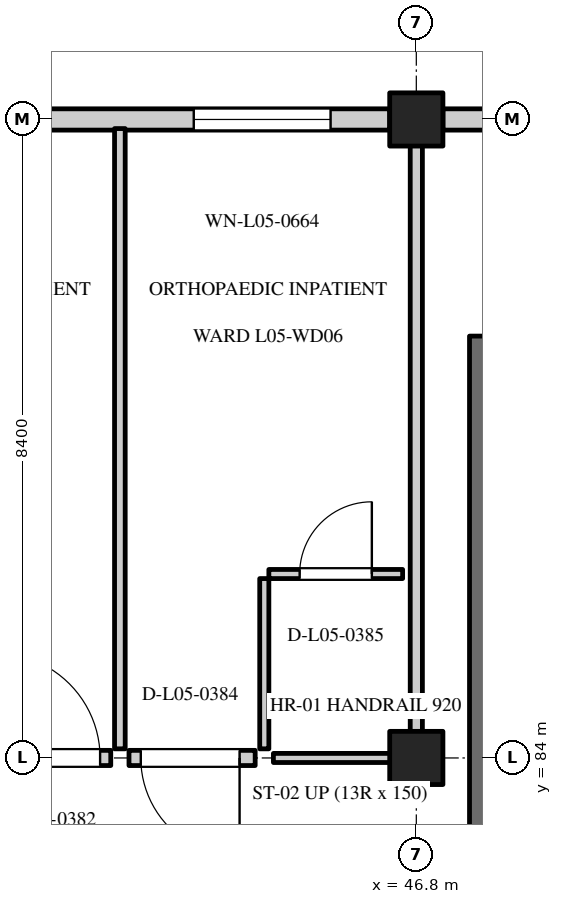
"""IFC4 building model, lengths in metres.
Left out: names, types, materials, properties, quantities, classifications, styles, units other than length and angle.
Written with IfcOpenShell. Run it as: python <this file> out.ifc"""

import sys

from ifc_helpers import new_model, si_unit, direction, frame, frame_2d, origin, origin_2d, place, context, subcontext, project, spatial, rectangle, extrude, element, fill, save


model = new_model("IFC4")
c1 = context("Model", 3, precision=1e-05, world=origin(), true_north=direction((0.0, 1.0)))
c2 = subcontext(c1, "Body", "Model", "MODEL_VIEW")
j1 = project(units=[si_unit("LENGTHUNIT", "METRE"), si_unit("PLANEANGLEUNIT", "RADIAN")], contexts=[c1])
p1 = place(None, origin())
s1 = spatial("IfcSite", under=j1, at=p1, CompositionType="ELEMENT")
p2 = place(p1, origin())
s2 = spatial("IfcBuilding", under=s1, at=p2, CompositionType="ELEMENT")
p3 = place(p2, frame((0.0, 0.0, 22.2)))
s3 = spatial("IfcBuildingStorey", under=s2, at=p3, CompositionType="ELEMENT", Elevation=22.2)
for number, where, z_axis, x_axis in (
    (1, (46.8, 84.0, 0.0), (0.0, 0.0, 1.0), (1.0, 0.0, 0.0)),
    (2, (46.8, 92.4, 0.0), (0.0, 0.0, 1.0), (1.0, 0.0, 0.0)),
):
    element("IfcColumn", number, at=place(p3, frame(where, z_axis=z_axis, x_axis=x_axis)), inside=s3, PredefinedType="COLUMN", context=c2, shape_type="SweptSolid", body=[
        extrude(rectangle(XDim=0.7, YDim=0.7, at=origin_2d()), origin(), (0.0, 0.0, 1.0), 3.9),
    ])
p4 = place(p3, frame((39.35, 92.4, 0.0), z_axis=(0.0, 0.0, 1.0), x_axis=(1.0, 0.0, 0.0)))
e3 = element("IfcWall", 3, at=p4, inside=s3, PredefinedType="STANDARD", context=c2, shape_type="SweptSolid", body=[
    extrude(rectangle(XDim=7.1, YDim=0.28, at=frame_2d((3.55, 0.0))), origin(), (0.0, 0.0, 1.0), 3.05),
])
p5 = place(p4, frame((0.778, 0.0, 0.8)))
e4 = element("IfcOpeningElement", 4, at=p5, cuts=e3, PredefinedType="OPENING", context=c2, shape_type="SweptSolid", body=[
    extrude(rectangle(XDim=1.8, YDim=1.55, at=frame_2d((0.9, 0.775))), frame((0.0, 0.152, 0.0), z_axis=(0.0, -1.0, 0.0), x_axis=(1.0, 0.0, 0.0)), (0.0, 0.0, 1.0), 0.304),
])
p6 = place(p4, frame((4.522, 0.0, 0.8)))
e5 = element("IfcOpeningElement", 5, at=p6, cuts=e3, PredefinedType="OPENING", context=c2, shape_type="SweptSolid", body=[
    extrude(rectangle(XDim=1.8, YDim=1.55, at=frame_2d((0.9, 0.775))), frame((0.0, 0.152, 0.0), z_axis=(0.0, -1.0, 0.0), x_axis=(1.0, 0.0, 0.0)), (0.0, 0.0, 1.0), 0.304),
])
p7 = place(p3, frame((47.15, 92.4, 0.0), z_axis=(0.0, 0.0, 1.0), x_axis=(1.0, 0.0, 0.0)))
e6 = element("IfcWall", 6, at=p7, inside=s3, PredefinedType="STANDARD", context=c2, shape_type="SweptSolid", body=[
    extrude(rectangle(XDim=7.075, YDim=0.28, at=frame_2d((3.538, 0.0))), origin(), (0.0, 0.0, 1.0), 3.05),
])
p8 = place(p7, frame((0.778, 0.0, 0.8)))
e7 = element("IfcOpeningElement", 7, at=p8, cuts=e6, PredefinedType="OPENING", context=c2, shape_type="SweptSolid", body=[
    extrude(rectangle(XDim=1.8, YDim=1.45, at=frame_2d((0.9, 0.725))), frame((0.0, 0.152, 0.0), z_axis=(0.0, -1.0, 0.0), x_axis=(1.0, 0.0, 0.0)), (0.0, 0.0, 1.0), 0.304),
])
p9 = place(p7, frame((4.522, 0.0, 0.8)))
e8 = element("IfcOpeningElement", 8, at=p9, cuts=e6, PredefinedType="OPENING", context=c2, shape_type="SweptSolid", body=[
    extrude(rectangle(XDim=1.8, YDim=1.45, at=frame_2d((0.9, 0.725))), frame((0.0, 0.152, 0.0), z_axis=(0.0, -1.0, 0.0), x_axis=(1.0, 0.0, 0.0)), (0.0, 0.0, 1.0), 0.304),
])
p10 = place(p3, frame((47.675, 79.05, 0.0), z_axis=(0.0, 0.0, 1.0), x_axis=(0.0, 1.0, 0.0)))
e9 = element("IfcWall", 9, at=p10, inside=s3, PredefinedType="SHEAR", context=c2, shape_type="SweptSolid", body=[
    extrude(rectangle(XDim=10.5, YDim=0.35, at=frame_2d((5.25, 0.0))), origin(), (0.0, 0.0, 1.0), 3.9),
])
p11 = place(p3, frame((42.9, 84.12, 0.0), z_axis=(0.0, 0.0, 1.0), x_axis=(0.0, 1.0, 0.0)))
e10 = element("IfcWall", 10, at=p11, inside=s3, PredefinedType="PARTITIONING", context=c2, shape_type="SweptSolid", body=[
    extrude(rectangle(XDim=8.16, YDim=0.14, at=frame_2d((4.08, 0.0))), origin(), (0.0, 0.0, 1.0), 3.58),
])
p12 = place(p3, frame((41.12, 84.0, 0.0), z_axis=(0.0, 0.0, 1.0), x_axis=(1.0, 0.0, 0.0)))
e11 = element("IfcWall", 11, at=p12, inside=s3, PredefinedType="STANDARD", context=c2, shape_type="SweptSolid", body=[
    extrude(rectangle(XDim=1.66, YDim=0.2, at=frame_2d((0.83, 0.0))), origin(), (0.0, 0.0, 1.0), 2.95),
])
p13 = place(p12, frame((0.14, 0.0, 0.0)))
e12 = element("IfcOpeningElement", 12, at=p13, cuts=e11, PredefinedType="OPENING", context=c2, shape_type="SweptSolid", body=[
    extrude(rectangle(XDim=1.38, YDim=2.2, at=frame_2d((0.69, 1.1))), frame((0.0, 0.112, 0.0), z_axis=(0.0, -1.0, 0.0), x_axis=(1.0, 0.0, 0.0)), (0.0, 0.0, 1.0), 0.224),
])
p14 = place(p3, frame((46.8, 84.12, 0.0), z_axis=(0.0, 0.0, 1.0), x_axis=(0.0, 1.0, 0.0)))
e13 = element("IfcWall", 13, at=p14, inside=s3, PredefinedType="PARTITIONING", context=c2, shape_type="SweptSolid", body=[
    extrude(rectangle(XDim=8.16, YDim=0.16, at=frame_2d((4.08, 0.0))), origin(), (0.0, 0.0, 1.0), 3.58),
])
p15 = place(p3, frame((43.02, 84.0, 0.0), z_axis=(0.0, 0.0, 1.0), x_axis=(1.0, 0.0, 0.0)))
e14 = element("IfcWall", 14, at=p15, inside=s3, PredefinedType="STANDARD", context=c2, shape_type="SweptSolid", body=[
    extrude(rectangle(XDim=1.66, YDim=0.2, at=frame_2d((0.83, 0.0))), origin(), (0.0, 0.0, 1.0), 2.95),
])
p16 = place(p15, frame((0.155, 0.0, 0.0)))
e15 = element("IfcOpeningElement", 15, at=p16, cuts=e14, PredefinedType="OPENING", context=c2, shape_type="SweptSolid", body=[
    extrude(rectangle(XDim=1.3, YDim=2.15, at=frame_2d((0.65, 1.075))), frame((0.0, 0.112, 0.0), z_axis=(0.0, -1.0, 0.0), x_axis=(1.0, 0.0, 0.0)), (0.0, 0.0, 1.0), 0.224),
])
p17 = place(p3, frame((44.92, 84.0, 0.0), z_axis=(0.0, 0.0, 1.0), x_axis=(1.0, 0.0, 0.0)))
e16 = element("IfcWall", 16, at=p17, inside=s3, PredefinedType="PARTITIONING", context=c2, shape_type="SweptSolid", body=[
    extrude(rectangle(XDim=1.76, YDim=0.12, at=frame_2d((0.88, 0.0))), origin(), (0.0, 0.0, 1.0), 2.95),
])
p18 = place(p3, frame((44.8, 84.12, 0.0), z_axis=(0.0, 0.0, 1.0), x_axis=(0.0, 1.0, 0.0)))
e17 = element("IfcWall", 17, at=p18, inside=s3, PredefinedType="PARTITIONING", context=c2, shape_type="SweptSolid", body=[
    extrude(rectangle(XDim=2.24, YDim=0.12, at=frame_2d((1.12, 0.0))), origin(), (0.0, 0.0, 1.0), 3.58),
])
p19 = place(p3, frame((44.86, 86.42, 0.0), z_axis=(0.0, 0.0, 1.0), x_axis=(1.0, 0.0, 0.0)))
e18 = element("IfcWall", 18, at=p19, inside=s3, PredefinedType="PARTITIONING", context=c2, shape_type="SweptSolid", body=[
    extrude(rectangle(XDim=1.76, YDim=0.12, at=frame_2d((0.88, 0.0))), origin(), (0.0, 0.0, 1.0), 3.58),
])
p20 = place(p19, frame((0.405, 0.0, 0.0)))
e19 = element("IfcOpeningElement", 19, at=p20, cuts=e18, PredefinedType="OPENING", context=c2, shape_type="SweptSolid", body=[
    extrude(rectangle(XDim=0.95, YDim=2.1, at=frame_2d((0.475, 1.05))), frame((0.0, 0.072, 0.0), z_axis=(0.0, -1.0, 0.0), x_axis=(1.0, 0.0, 0.0)), (0.0, 0.0, 1.0), 0.144),
])
p21 = place(p6, origin())
e20 = element("IfcWindow", 20, at=p21, inside=s3, PartitioningType="DOUBLE_PANEL_VERTICAL", PredefinedType="WINDOW", context=c2, shape_type="SweptSolid", body=[
    extrude(rectangle(XDim=1.8, YDim=1.55, at=frame_2d((0.9, 0.775))), frame((0.0, 0.03, 0.0), z_axis=(0.0, -1.0, 0.0), x_axis=(1.0, 0.0, 0.0)), (0.0, 0.0, 1.0), 0.06),
])
fill(e5, e20)
p22 = place(p13, origin())
e21 = element("IfcDoor", 21, at=p22, inside=s3, OperationType="SINGLE_SWING_LEFT", PredefinedType="DOOR", context=c2, shape_type="SweptSolid", body=[
    extrude(rectangle(XDim=1.38, YDim=2.2, at=frame_2d((0.69, 1.1))), frame((0.0, 0.025, 0.0), z_axis=(0.0, -1.0, 0.0), x_axis=(1.0, 0.0, 0.0)), (0.0, 0.0, 1.0), 0.05),
])
fill(e12, e21)
p23 = place(p16, origin())
e22 = element("IfcDoor", 22, at=p23, inside=s3, OperationType="SINGLE_SWING_RIGHT", PredefinedType="DOOR", context=c2, shape_type="SweptSolid", body=[
    extrude(rectangle(XDim=1.3, YDim=2.15, at=frame_2d((0.65, 1.075))), frame((0.0, 0.025, 0.0), z_axis=(0.0, -1.0, 0.0), x_axis=(1.0, 0.0, 0.0)), (0.0, 0.0, 1.0), 0.05),
])
fill(e15, e22)
p24 = place(p20, frame((0.95, 0.0, 0.0), z_axis=(0.0, 0.0, 1.0), x_axis=(-1.0, 0.0, 0.0)))
e23 = element("IfcDoor", 23, at=p24, inside=s3, OperationType="SINGLE_SWING_LEFT", PredefinedType="DOOR", context=c2, shape_type="SweptSolid", body=[
    extrude(rectangle(XDim=0.95, YDim=2.1, at=frame_2d((0.475, 1.05))), frame((0.0, 0.025, 0.0), z_axis=(0.0, -1.0, 0.0), x_axis=(1.0, 0.0, 0.0)), (0.0, 0.0, 1.0), 0.05),
])
fill(e19, e23)
save(model, sys.argv[1])
